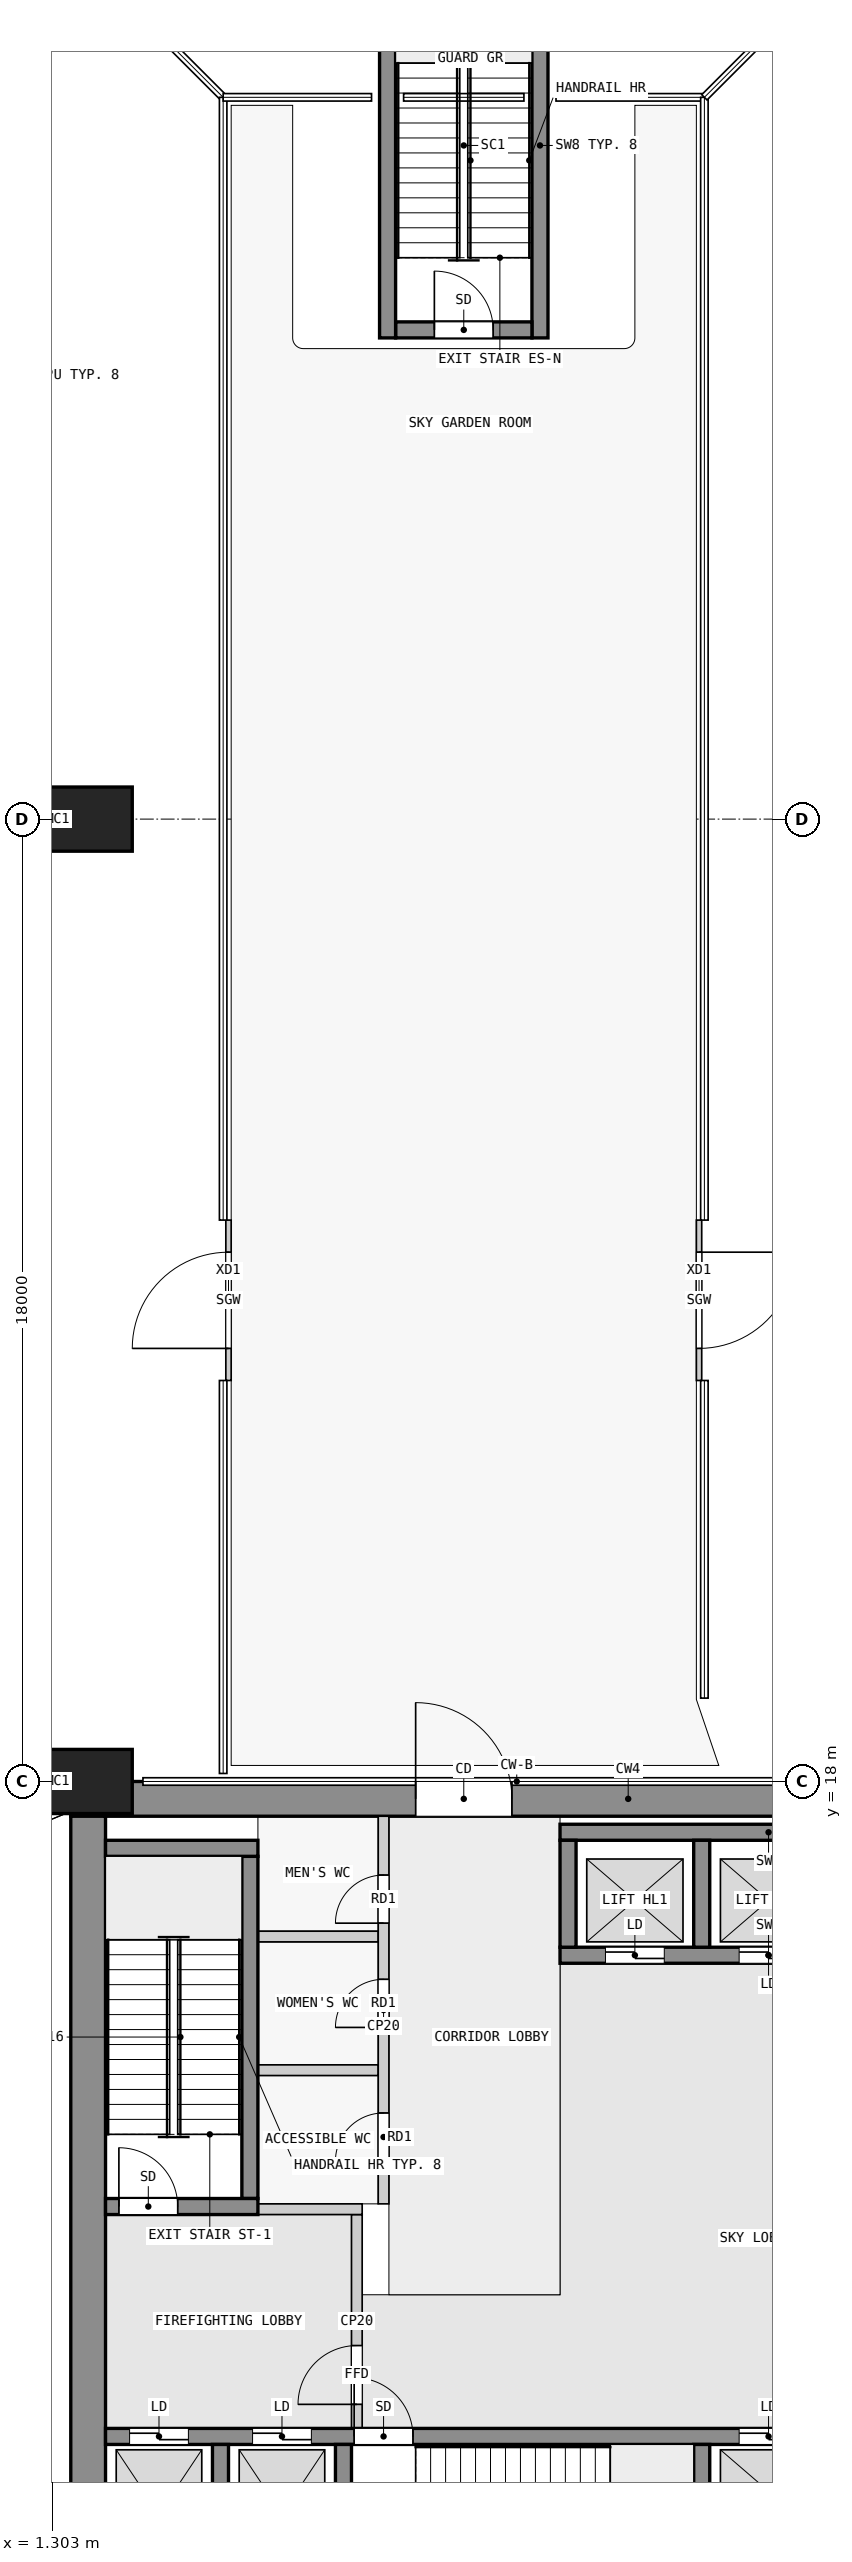
"""IFC4 building model, lengths in metres.
Left out: names, types, materials, properties, quantities, classifications, styles, units other than length and angle.
Written with IfcOpenShell. Run it as: python <this file> out.ifc"""

import sys

from ifc_helpers import new_model, si_unit, direction, frame, frame_2d, origin, origin_2d, place, context, subcontext, project, spatial, rectangle, extrude, element, fill, save


model = new_model("IFC4")
c1 = context("Model", 3, precision=1e-05, world=origin(), true_north=direction((0.0, 1.0)))
c2 = subcontext(c1, "Body", "Model", "MODEL_VIEW")
j1 = project(units=[si_unit("LENGTHUNIT", "METRE"), si_unit("PLANEANGLEUNIT", "RADIAN")], contexts=[c1])
p1 = place(None, origin())
s1 = spatial("IfcSite", under=j1, at=p1, CompositionType="ELEMENT")
p2 = place(p1, origin())
s2 = spatial("IfcBuilding", under=s1, at=p2, CompositionType="ELEMENT")
p3 = place(p2, frame((0.0, 0.0, 123.8)))
s3 = spatial("IfcBuildingStorey", under=s2, at=p3, CompositionType="ELEMENT", Elevation=123.8)
for number, where, z_axis, x_axis in (
    (1, (1.4, 36.0, 0.0), (0.0, 0.0, 1.0), (0.0, 1.0, 0.0)),
    (2, (1.4, 18.0, 0.0), (0.0, 0.0, 1.0), (0.0, 1.0, 0.0)),
):
    element("IfcColumn", number, at=place(p3, frame(where, z_axis=z_axis, x_axis=x_axis)), inside=s3, PredefinedType="COLUMN", context=c2, shape_type="SweptSolid", body=[
        extrude(rectangle(XDim=1.2, YDim=2.8, at=origin_2d()), origin(), (0.0, 0.0, 1.0), 4.8),
    ])
p4 = place(p3, frame((1.65, 17.675, 0.0), z_axis=(0.0, 0.0, 1.0), x_axis=(1.0, 0.0, 0.0)))
e3 = element("IfcWall", 3, at=p4, inside=s3, PredefinedType="SHEAR", context=c2, shape_type="SweptSolid", body=[
    extrude(rectangle(XDim=20.85, YDim=0.65, at=frame_2d((10.425, 0.0))), origin(), (0.0, 0.0, 1.0), 4.5),
])
p5 = place(p4, frame((6.45, 0.0, 0.0)))
e4 = element("IfcOpeningElement", 4, at=p5, cuts=e3, PredefinedType="OPENING", context=c2, shape_type="SweptSolid", body=[
    extrude(rectangle(XDim=1.8, YDim=2.1, at=frame_2d((0.9, 1.05))), frame((0.0, 0.335, 0.0), z_axis=(0.0, -1.0, 0.0), x_axis=(1.0, 0.0, 0.0)), (0.0, 0.0, 1.0), 0.67),
])
p6 = place(p3, frame((1.975, 2.5, 0.0), z_axis=(0.0, 0.0, 1.0), x_axis=(0.0, 1.0, 0.0)))
e5 = element("IfcWall", 5, at=p6, inside=s3, PredefinedType="SHEAR", context=c2, shape_type="SweptSolid", body=[
    extrude(rectangle(XDim=14.85, YDim=0.65, at=frame_2d((7.425, 0.0))), origin(), (0.0, 0.0, 1.0), 4.5),
])
for number, where, z_axis, x_axis in (
    (6, (4.45, 2.8, 0.0), (0.0, 0.0, 1.0), (0.0, 1.0, 0.0)),
    (7, (6.75, 2.8, 0.0), (0.0, 0.0, 1.0), (0.0, 1.0, 0.0)),
    (8, (13.45, 2.8, 0.0), (0.0, 0.0, 1.0), (0.0, 1.0, 0.0)),
):
    element("IfcWall", number, at=place(p3, frame(where, z_axis=z_axis, x_axis=x_axis)), inside=s3, PredefinedType="SHEAR", context=c2, shape_type="SweptSolid", body=[
        extrude(rectangle(XDim=2.8, YDim=0.3, at=frame_2d((1.4, 0.0))), origin(), (0.0, 0.0, 1.0), 4.5),
    ])
p7 = place(p3, frame((2.3, 5.75, 0.0), z_axis=(0.0, 0.0, 1.0), x_axis=(1.0, 0.0, 0.0)))
e9 = element("IfcWall", 9, at=p7, inside=s3, PredefinedType="SHEAR", context=c2, shape_type="SweptSolid", body=[
    extrude(rectangle(XDim=18.8, YDim=0.3, at=frame_2d((9.4, 0.0))), origin(), (0.0, 0.0, 1.0), 4.5),
])
p8 = place(p7, frame((4.65, 0.0, 0.0)))
e10 = element("IfcOpeningElement", 10, at=p8, cuts=e9, PredefinedType="OPENING", context=c2, shape_type="SweptSolid", body=[
    extrude(rectangle(XDim=1.1, YDim=2.1, at=frame_2d((0.55, 1.05))), frame((0.0, 0.16, 0.0), z_axis=(0.0, -1.0, 0.0), x_axis=(1.0, 0.0, 0.0)), (0.0, 0.0, 1.0), 0.32),
])
p9 = place(p7, frame((0.45, 0.0, 0.0)))
e11 = element("IfcOpeningElement", 11, at=p9, cuts=e9, PredefinedType="OPENING", context=c2, shape_type="SweptSolid", body=[
    extrude(rectangle(XDim=1.1, YDim=2.1, at=frame_2d((0.55, 1.05))), frame((0.0, 0.16, 0.0), z_axis=(0.0, -1.0, 0.0), x_axis=(1.0, 0.0, 0.0)), (0.0, 0.0, 1.0), 0.32),
])
p10 = place(p7, frame((2.75, 0.0, 0.0)))
e12 = element("IfcOpeningElement", 12, at=p10, cuts=e9, PredefinedType="OPENING", context=c2, shape_type="SweptSolid", body=[
    extrude(rectangle(XDim=1.1, YDim=2.1, at=frame_2d((0.55, 1.05))), frame((0.0, 0.16, 0.0), z_axis=(0.0, -1.0, 0.0), x_axis=(1.0, 0.0, 0.0)), (0.0, 0.0, 1.0), 0.32),
])
p11 = place(p7, frame((11.85, 0.0, 0.0)))
e13 = element("IfcOpeningElement", 13, at=p11, cuts=e9, PredefinedType="OPENING", context=c2, shape_type="SweptSolid", body=[
    extrude(rectangle(XDim=1.1, YDim=2.1, at=frame_2d((0.55, 1.05))), frame((0.0, 0.16, 0.0), z_axis=(0.0, -1.0, 0.0), x_axis=(1.0, 0.0, 0.0)), (0.0, 0.0, 1.0), 0.32),
])
p12 = place(p7, frame((14.35, 0.0, 0.0)))
e14 = element("IfcOpeningElement", 14, at=p12, cuts=e9, PredefinedType="OPENING", context=c2, shape_type="SweptSolid", body=[
    extrude(rectangle(XDim=1.1, YDim=2.1, at=frame_2d((0.55, 1.05))), frame((0.0, 0.16, 0.0), z_axis=(0.0, -1.0, 0.0), x_axis=(1.0, 0.0, 0.0)), (0.0, 0.0, 1.0), 0.32),
])
p13 = place(p7, frame((16.85, 0.0, 0.0)))
e15 = element("IfcOpeningElement", 15, at=p13, cuts=e9, PredefinedType="OPENING", context=c2, shape_type="SweptSolid", body=[
    extrude(rectangle(XDim=1.1, YDim=2.1, at=frame_2d((0.55, 1.05))), frame((0.0, 0.16, 0.0), z_axis=(0.0, -1.0, 0.0), x_axis=(1.0, 0.0, 0.0)), (0.0, 0.0, 1.0), 0.32),
])
p14 = place(p3, frame((2.3, 10.05, 0.0), z_axis=(0.0, 0.0, 1.0), x_axis=(1.0, 0.0, 0.0)))
e16 = element("IfcWall", 16, at=p14, inside=s3, PredefinedType="SHEAR", context=c2, shape_type="SweptSolid", body=[
    extrude(rectangle(XDim=2.85, YDim=0.3, at=frame_2d((1.425, 0.0))), origin(), (0.0, 0.0, 1.0), 4.5),
])
p15 = place(p14, frame((0.25, 0.0, 0.0)))
e17 = element("IfcOpeningElement", 17, at=p15, cuts=e16, PredefinedType="OPENING", context=c2, shape_type="SweptSolid", body=[
    extrude(rectangle(XDim=1.1, YDim=2.1, at=frame_2d((0.55, 1.05))), frame((0.0, 0.16, 0.0), z_axis=(0.0, -1.0, 0.0), x_axis=(1.0, 0.0, 0.0)), (0.0, 0.0, 1.0), 0.32),
])
p16 = place(p3, frame((5.0, 10.2, 0.0), z_axis=(0.0, 0.0, 1.0), x_axis=(0.0, 1.0, 0.0)))
e18 = element("IfcWall", 18, at=p16, inside=s3, PredefinedType="SHEAR", context=c2, shape_type="SweptSolid", body=[
    extrude(rectangle(XDim=6.4, YDim=0.3, at=frame_2d((3.2, 0.0))), origin(), (0.0, 0.0, 1.0), 4.5),
])
p17 = place(p3, frame((2.3, 16.75, 0.0), z_axis=(0.0, 0.0, 1.0), x_axis=(1.0, 0.0, 0.0)))
e19 = element("IfcWall", 19, at=p17, inside=s3, PredefinedType="SHEAR", context=c2, shape_type="SweptSolid", body=[
    extrude(rectangle(XDim=2.85, YDim=0.3, at=frame_2d((1.425, 0.0))), origin(), (0.0, 0.0, 1.0), 4.5),
])
p18 = place(p3, frame((10.8, 17.05, 0.0), z_axis=(0.0, 0.0, 1.0), x_axis=(1.0, 0.0, 0.0)))
e20 = element("IfcWall", 20, at=p18, inside=s3, PredefinedType="SHEAR", context=c2, shape_type="SweptSolid", body=[
    extrude(rectangle(XDim=7.8, YDim=0.3, at=frame_2d((3.9, 0.0))), origin(), (0.0, 0.0, 1.0), 4.5),
])
p19 = place(p3, frame((10.8, 14.75, 0.0), z_axis=(0.0, 0.0, 1.0), x_axis=(1.0, 0.0, 0.0)))
e21 = element("IfcWall", 21, at=p19, inside=s3, PredefinedType="SHEAR", context=c2, shape_type="SweptSolid", body=[
    extrude(rectangle(XDim=7.8, YDim=0.3, at=frame_2d((3.9, 0.0))), origin(), (0.0, 0.0, 1.0), 4.5),
])
p20 = place(p19, frame((0.85, 0.0, 0.0)))
e22 = element("IfcOpeningElement", 22, at=p20, cuts=e21, PredefinedType="OPENING", context=c2, shape_type="SweptSolid", body=[
    extrude(rectangle(XDim=1.1, YDim=2.1, at=frame_2d((0.55, 1.05))), frame((0.0, 0.16, 0.0), z_axis=(0.0, -1.0, 0.0), x_axis=(1.0, 0.0, 0.0)), (0.0, 0.0, 1.0), 0.32),
])
p21 = place(p19, frame((3.35, 0.0, 0.0)))
e23 = element("IfcOpeningElement", 23, at=p21, cuts=e21, PredefinedType="OPENING", context=c2, shape_type="SweptSolid", body=[
    extrude(rectangle(XDim=1.1, YDim=2.1, at=frame_2d((0.55, 1.05))), frame((0.0, 0.16, 0.0), z_axis=(0.0, -1.0, 0.0), x_axis=(1.0, 0.0, 0.0)), (0.0, 0.0, 1.0), 0.32),
])
p22 = place(p19, frame((5.85, 0.0, 0.0)))
e24 = element("IfcOpeningElement", 24, at=p22, cuts=e21, PredefinedType="OPENING", context=c2, shape_type="SweptSolid", body=[
    extrude(rectangle(XDim=1.1, YDim=2.1, at=frame_2d((0.55, 1.05))), frame((0.0, 0.16, 0.0), z_axis=(0.0, -1.0, 0.0), x_axis=(1.0, 0.0, 0.0)), (0.0, 0.0, 1.0), 0.32),
])
for number, where, z_axis, x_axis in (
    (25, (10.95, 14.9, 0.0), (0.0, 0.0, 1.0), (0.0, 1.0, 0.0)),
    (26, (13.45, 14.9, 0.0), (0.0, 0.0, 1.0), (0.0, 1.0, 0.0)),
):
    element("IfcWall", number, at=place(p3, frame(where, z_axis=z_axis, x_axis=x_axis)), inside=s3, PredefinedType="SHEAR", context=c2, shape_type="SweptSolid", body=[
        extrude(rectangle(XDim=2.0, YDim=0.3, at=frame_2d((1.0, 0.0))), origin(), (0.0, 0.0, 1.0), 4.5),
    ])
p23 = place(p3, frame((7.725, 45.15, 0.0), z_axis=(0.0, 0.0, 1.0), x_axis=(1.0, 0.0, 0.0)))
e27 = element("IfcWall", 27, at=p23, inside=s3, PredefinedType="SHEAR", context=c2, shape_type="SweptSolid", body=[
    extrude(rectangle(XDim=2.55, YDim=0.3, at=frame_2d((1.275, 0.0))), origin(), (0.0, 0.0, 1.0), 4.8),
])
p24 = place(p23, frame((0.725, 0.0, 0.0)))
e28 = element("IfcOpeningElement", 28, at=p24, cuts=e27, PredefinedType="OPENING", context=c2, shape_type="SweptSolid", body=[
    extrude(rectangle(XDim=1.1, YDim=2.1, at=frame_2d((0.55, 1.05))), frame((0.0, 0.16, 0.0), z_axis=(0.0, -1.0, 0.0), x_axis=(1.0, 0.0, 0.0)), (0.0, 0.0, 1.0), 0.32),
])
for number, where, z_axis, x_axis in (
    (29, (7.575, 45.0, 0.0), (0.0, 0.0, 1.0), (0.0, 1.0, 0.0)),
    (30, (10.425, 45.0, 0.0), (0.0, 0.0, 1.0), (0.0, 1.0, 0.0)),
):
    element("IfcWall", number, at=place(p3, frame(where, z_axis=z_axis, x_axis=x_axis)), inside=s3, PredefinedType="SHEAR", context=c2, shape_type="SweptSolid", body=[
        extrude(rectangle(XDim=7.2, YDim=0.3, at=frame_2d((3.6, 0.0))), origin(), (0.0, 0.0, 1.0), 4.8),
    ])
p25 = place(p3, frame((13.4, 28.5, 0.0), z_axis=(0.0, 0.0, 1.0), x_axis=(0.0, -1.0, 0.0)))
e31 = element("IfcWall", 31, at=p25, inside=s3, PredefinedType="STANDARD", context=c2, shape_type="SweptSolid", body=[
    extrude(rectangle(XDim=3.0, YDim=0.1, at=frame_2d((1.5, 0.0))), origin(), (0.0, 0.0, 1.0), 4.8),
])
p26 = place(p25, frame((0.6, 0.0, 0.0)))
e32 = element("IfcOpeningElement", 32, at=p26, cuts=e31, PredefinedType="OPENING", context=c2, shape_type="SweptSolid", body=[
    extrude(rectangle(XDim=1.8, YDim=2.4, at=frame_2d((0.9, 1.2))), frame((0.0, 0.06, 0.0), z_axis=(0.0, -1.0, 0.0), x_axis=(1.0, 0.0, 0.0)), (0.0, 0.0, 1.0), 0.12),
])
p27 = place(p3, frame((4.6, 25.5, 0.0), z_axis=(0.0, 0.0, 1.0), x_axis=(0.0, 1.0, 0.0)))
e33 = element("IfcWall", 33, at=p27, inside=s3, PredefinedType="STANDARD", context=c2, shape_type="SweptSolid", body=[
    extrude(rectangle(XDim=3.0, YDim=0.1, at=frame_2d((1.5, 0.0))), origin(), (0.0, 0.0, 1.0), 4.8),
])
p28 = place(p27, frame((0.6, 0.0, 0.0)))
e34 = element("IfcOpeningElement", 34, at=p28, cuts=e33, PredefinedType="OPENING", context=c2, shape_type="SweptSolid", body=[
    extrude(rectangle(XDim=1.8, YDim=2.4, at=frame_2d((0.9, 1.2))), frame((0.0, 0.06, 0.0), z_axis=(0.0, -1.0, 0.0), x_axis=(1.0, 0.0, 0.0)), (0.0, 0.0, 1.0), 0.12),
])
p29 = place(p3, frame((7.0, 5.9, 0.0), z_axis=(0.0, 0.0, 1.0), x_axis=(0.0, 1.0, 0.0)))
e35 = element("IfcWall", 35, at=p29, inside=s3, PredefinedType="PARTITIONING", context=c2, shape_type="SweptSolid", body=[
    extrude(rectangle(XDim=4.0, YDim=0.2, at=frame_2d((2.0, 0.0))), origin(), (0.0, 0.0, 1.0), 4.5),
])
p30 = place(p29, frame((0.45, 0.0, 0.0)))
e36 = element("IfcOpeningElement", 36, at=p30, cuts=e35, PredefinedType="OPENING", context=c2, shape_type="SweptSolid", body=[
    extrude(rectangle(XDim=1.1, YDim=2.1, at=frame_2d((0.55, 1.05))), frame((0.0, 0.11, 0.0), z_axis=(0.0, -1.0, 0.0), x_axis=(1.0, 0.0, 0.0)), (0.0, 0.0, 1.0), 0.22),
])
p31 = place(p3, frame((5.15, 10.0, 0.0), z_axis=(0.0, 0.0, 1.0), x_axis=(1.0, 0.0, 0.0)))
e37 = element("IfcWall", 37, at=p31, inside=s3, PredefinedType="PARTITIONING", context=c2, shape_type="SweptSolid", body=[
    extrude(rectangle(XDim=1.95, YDim=0.2, at=frame_2d((0.975, 0.0))), origin(), (0.0, 0.0, 1.0), 4.5),
])
p32 = place(p3, frame((7.5, 10.1, 0.0), z_axis=(0.0, 0.0, 1.0), x_axis=(0.0, 1.0, 0.0)))
e38 = element("IfcWall", 38, at=p32, inside=s3, PredefinedType="PARTITIONING", context=c2, shape_type="SweptSolid", body=[
    extrude(rectangle(XDim=7.25, YDim=0.2, at=frame_2d((3.625, 0.0))), origin(), (0.0, 0.0, 1.0), 4.5),
])
p33 = place(p32, frame((0.8, 0.0, 0.0)))
e39 = element("IfcOpeningElement", 39, at=p33, cuts=e38, PredefinedType="OPENING", context=c2, shape_type="SweptSolid", body=[
    extrude(rectangle(XDim=0.9, YDim=2.1, at=frame_2d((0.45, 1.05))), frame((0.0, 0.11, 0.0), z_axis=(0.0, -1.0, 0.0), x_axis=(1.0, 0.0, 0.0)), (0.0, 0.0, 1.0), 0.22),
])
p34 = place(p32, frame((3.3, 0.0, 0.0)))
e40 = element("IfcOpeningElement", 40, at=p34, cuts=e38, PredefinedType="OPENING", context=c2, shape_type="SweptSolid", body=[
    extrude(rectangle(XDim=0.9, YDim=2.1, at=frame_2d((0.45, 1.05))), frame((0.0, 0.11, 0.0), z_axis=(0.0, -1.0, 0.0), x_axis=(1.0, 0.0, 0.0)), (0.0, 0.0, 1.0), 0.22),
])
p35 = place(p32, frame((5.25, 0.0, 0.0)))
e41 = element("IfcOpeningElement", 41, at=p35, cuts=e38, PredefinedType="OPENING", context=c2, shape_type="SweptSolid", body=[
    extrude(rectangle(XDim=0.9, YDim=2.1, at=frame_2d((0.45, 1.05))), frame((0.0, 0.11, 0.0), z_axis=(0.0, -1.0, 0.0), x_axis=(1.0, 0.0, 0.0)), (0.0, 0.0, 1.0), 0.22),
])
for number, where, z_axis, x_axis in (
    (42, (5.15, 12.6, 0.0), (0.0, 0.0, 1.0), (1.0, 0.0, 0.0)),
    (43, (5.15, 15.1, 0.0), (0.0, 0.0, 1.0), (1.0, 0.0, 0.0)),
):
    element("IfcWall", number, at=place(p3, frame(where, z_axis=z_axis, x_axis=x_axis)), inside=s3, PredefinedType="PARTITIONING", context=c2, shape_type="SweptSolid", body=[
        extrude(rectangle(XDim=2.25, YDim=0.2, at=frame_2d((1.125, 0.0))), origin(), (0.0, 0.0, 1.0), 4.5),
    ])
p36 = place(p26, origin())
e44 = element("IfcDoor", 44, at=p36, inside=s3, OperationType="SINGLE_SWING_LEFT", PredefinedType="DOOR", context=c2, shape_type="SweptSolid", body=[
    extrude(rectangle(XDim=1.8, YDim=2.4, at=frame_2d((0.9, 1.2))), frame((0.0, 0.025, 0.0), z_axis=(0.0, -1.0, 0.0), x_axis=(1.0, 0.0, 0.0)), (0.0, 0.0, 1.0), 0.05),
])
fill(e32, e44)
p37 = place(p28, origin())
e45 = element("IfcDoor", 45, at=p37, inside=s3, OperationType="SINGLE_SWING_LEFT", PredefinedType="DOOR", context=c2, shape_type="SweptSolid", body=[
    extrude(rectangle(XDim=1.8, YDim=2.4, at=frame_2d((0.9, 1.2))), frame((0.0, 0.025, 0.0), z_axis=(0.0, -1.0, 0.0), x_axis=(1.0, 0.0, 0.0)), (0.0, 0.0, 1.0), 0.05),
])
fill(e34, e45)
p38 = place(p30, origin())
e46 = element("IfcDoor", 46, at=p38, inside=s3, OperationType="SINGLE_SWING_LEFT", PredefinedType="DOOR", context=c2, shape_type="SweptSolid", body=[
    extrude(rectangle(XDim=1.1, YDim=2.1, at=frame_2d((0.55, 1.05))), frame((0.0, 0.025, 0.0), z_axis=(0.0, -1.0, 0.0), x_axis=(1.0, 0.0, 0.0)), (0.0, 0.0, 1.0), 0.05),
])
fill(e36, e46)
p39 = place(p15, origin())
e47 = element("IfcDoor", 47, at=p39, inside=s3, OperationType="SINGLE_SWING_RIGHT", PredefinedType="DOOR", context=c2, shape_type="SweptSolid", body=[
    extrude(rectangle(XDim=1.1, YDim=2.1, at=frame_2d((0.55, 1.05))), frame((0.0, 0.025, 0.0), z_axis=(0.0, -1.0, 0.0), x_axis=(1.0, 0.0, 0.0)), (0.0, 0.0, 1.0), 0.05),
])
fill(e17, e47)
p40 = place(p8, origin())
e48 = element("IfcDoor", 48, at=p40, inside=s3, OperationType="SINGLE_SWING_LEFT", PredefinedType="DOOR", context=c2, shape_type="SweptSolid", body=[
    extrude(rectangle(XDim=1.1, YDim=2.1, at=frame_2d((0.55, 1.05))), frame((0.0, 0.025, 0.0), z_axis=(0.0, -1.0, 0.0), x_axis=(1.0, 0.0, 0.0)), (0.0, 0.0, 1.0), 0.05),
])
fill(e10, e48)
p41 = place(p9, origin())
e49 = element("IfcDoor", 49, at=p41, inside=s3, OperationType="DOUBLE_DOOR_SLIDING", PredefinedType="DOOR", context=c2, shape_type="SweptSolid", body=[
    extrude(rectangle(XDim=1.1, YDim=2.1, at=frame_2d((0.55, 1.05))), frame((0.0, 0.025, 0.0), z_axis=(0.0, -1.0, 0.0), x_axis=(1.0, 0.0, 0.0)), (0.0, 0.0, 1.0), 0.05),
])
fill(e11, e49)
p42 = place(p10, origin())
e50 = element("IfcDoor", 50, at=p42, inside=s3, OperationType="DOUBLE_DOOR_SLIDING", PredefinedType="DOOR", context=c2, shape_type="SweptSolid", body=[
    extrude(rectangle(XDim=1.1, YDim=2.1, at=frame_2d((0.55, 1.05))), frame((0.0, 0.025, 0.0), z_axis=(0.0, -1.0, 0.0), x_axis=(1.0, 0.0, 0.0)), (0.0, 0.0, 1.0), 0.05),
])
fill(e12, e50)
p43 = place(p11, origin())
e51 = element("IfcDoor", 51, at=p43, inside=s3, OperationType="DOUBLE_DOOR_SLIDING", PredefinedType="DOOR", context=c2, shape_type="SweptSolid", body=[
    extrude(rectangle(XDim=1.1, YDim=2.1, at=frame_2d((0.55, 1.05))), frame((0.0, 0.025, 0.0), z_axis=(0.0, -1.0, 0.0), x_axis=(1.0, 0.0, 0.0)), (0.0, 0.0, 1.0), 0.05),
])
fill(e13, e51)
p44 = place(p20, origin())
e52 = element("IfcDoor", 52, at=p44, inside=s3, OperationType="DOUBLE_DOOR_SLIDING", PredefinedType="DOOR", context=c2, shape_type="SweptSolid", body=[
    extrude(rectangle(XDim=1.1, YDim=2.1, at=frame_2d((0.55, 1.05))), frame((0.0, 0.025, 0.0), z_axis=(0.0, -1.0, 0.0), x_axis=(1.0, 0.0, 0.0)), (0.0, 0.0, 1.0), 0.05),
])
fill(e22, e52)
p45 = place(p21, origin())
e53 = element("IfcDoor", 53, at=p45, inside=s3, OperationType="DOUBLE_DOOR_SLIDING", PredefinedType="DOOR", context=c2, shape_type="SweptSolid", body=[
    extrude(rectangle(XDim=1.1, YDim=2.1, at=frame_2d((0.55, 1.05))), frame((0.0, 0.025, 0.0), z_axis=(0.0, -1.0, 0.0), x_axis=(1.0, 0.0, 0.0)), (0.0, 0.0, 1.0), 0.05),
])
fill(e23, e53)
p46 = place(p5, origin())
e54 = element("IfcDoor", 54, at=p46, inside=s3, OperationType="DOUBLE_DOOR_SINGLE_SWING", PredefinedType="DOOR", context=c2, shape_type="SweptSolid", body=[
    extrude(rectangle(XDim=1.8, YDim=2.1, at=frame_2d((0.9, 1.05))), frame((0.0, 0.025, 0.0), z_axis=(0.0, -1.0, 0.0), x_axis=(1.0, 0.0, 0.0)), (0.0, 0.0, 1.0), 0.05),
])
fill(e4, e54)
p47 = place(p33, origin())
e55 = element("IfcDoor", 55, at=p47, inside=s3, OperationType="SINGLE_SWING_RIGHT", PredefinedType="DOOR", context=c2, shape_type="SweptSolid", body=[
    extrude(rectangle(XDim=0.9, YDim=2.1, at=frame_2d((0.45, 1.05))), frame((0.0, 0.025, 0.0), z_axis=(0.0, -1.0, 0.0), x_axis=(1.0, 0.0, 0.0)), (0.0, 0.0, 1.0), 0.05),
])
fill(e39, e55)
p48 = place(p34, origin())
e56 = element("IfcDoor", 56, at=p48, inside=s3, OperationType="SINGLE_SWING_RIGHT", PredefinedType="DOOR", context=c2, shape_type="SweptSolid", body=[
    extrude(rectangle(XDim=0.9, YDim=2.1, at=frame_2d((0.45, 1.05))), frame((0.0, 0.025, 0.0), z_axis=(0.0, -1.0, 0.0), x_axis=(1.0, 0.0, 0.0)), (0.0, 0.0, 1.0), 0.05),
])
fill(e40, e56)
p49 = place(p35, origin())
e57 = element("IfcDoor", 57, at=p49, inside=s3, OperationType="SINGLE_SWING_RIGHT", PredefinedType="DOOR", context=c2, shape_type="SweptSolid", body=[
    extrude(rectangle(XDim=0.9, YDim=2.1, at=frame_2d((0.45, 1.05))), frame((0.0, 0.025, 0.0), z_axis=(0.0, -1.0, 0.0), x_axis=(1.0, 0.0, 0.0)), (0.0, 0.0, 1.0), 0.05),
])
fill(e41, e57)
p50 = place(p24, origin())
e58 = element("IfcDoor", 58, at=p50, inside=s3, OperationType="SINGLE_SWING_LEFT", PredefinedType="DOOR", context=c2, shape_type="SweptSolid", body=[
    extrude(rectangle(XDim=1.1, YDim=2.1, at=frame_2d((0.55, 1.05))), frame((0.0, 0.025, 0.0), z_axis=(0.0, -1.0, 0.0), x_axis=(1.0, 0.0, 0.0)), (0.0, 0.0, 1.0), 0.05),
])
fill(e28, e58)
save(model, sys.argv[1])
